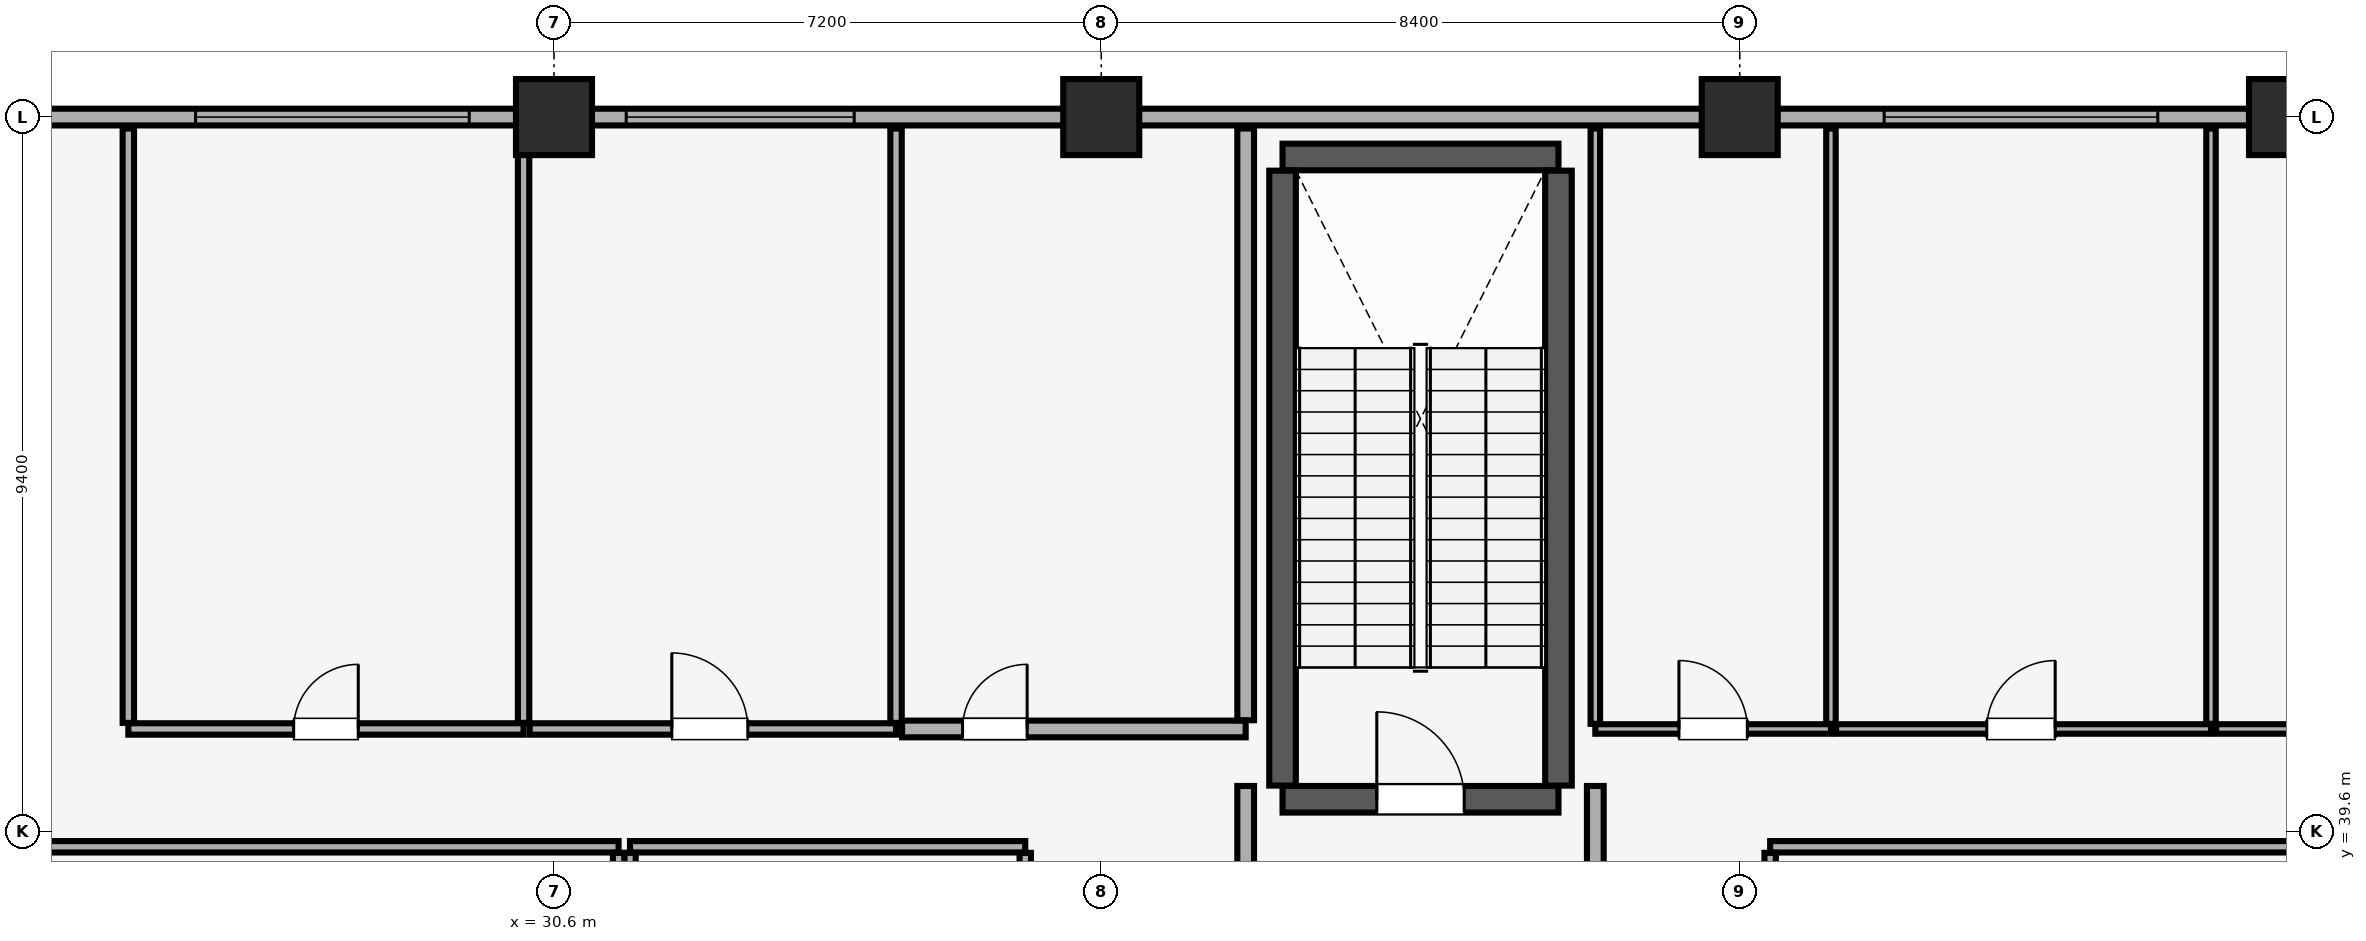
"""IFC4 building model, lengths in metres.
Left out: names, types, materials, properties, quantities, classifications, styles, units other than length and angle.
Written with IfcOpenShell. Run it as: python <this file> out.ifc"""

import sys

from ifc_helpers import new_model, si_unit, direction, frame, frame_2d, origin, origin_2d, place, context, subcontext, project, spatial, rectangle, extrude, element, fill, save


model = new_model("IFC4")
c1 = context("Model", 3, precision=1e-05, world=origin(), true_north=direction((0.0, 1.0)))
c2 = subcontext(c1, "Body", "Model", "MODEL_VIEW")
j1 = project(units=[si_unit("LENGTHUNIT", "METRE"), si_unit("PLANEANGLEUNIT", "RADIAN")], contexts=[c1])
p1 = place(None, origin())
s1 = spatial("IfcSite", under=j1, at=p1, CompositionType="ELEMENT")
p2 = place(p1, origin())
s2 = spatial("IfcBuilding", under=s1, at=p2, CompositionType="ELEMENT")
p3 = place(p2, frame((0.0, 0.0, 300.2)))
s3 = spatial("IfcBuildingStorey", under=s2, at=p3, CompositionType="ELEMENT", Elevation=300.2)
for number, where, z_axis, x_axis in (
    (1, (30.6, 49.0, 0.0), (0.0, 0.0, 1.0), (1.0, 0.0, 0.0)),
    (2, (37.8, 49.0, 0.0), (0.0, 0.0, 1.0), (1.0, 0.0, 0.0)),
    (3, (46.2, 49.0, 0.0), (0.0, 0.0, 1.0), (1.0, 0.0, 0.0)),
    (4, (53.4, 49.0, 0.0), (0.0, 0.0, 1.0), (1.0, 0.0, 0.0)),
):
    element("IfcColumn", number, at=place(p3, frame(where, z_axis=z_axis, x_axis=x_axis)), inside=s3, PredefinedType="COLUMN", context=c2, shape_type="SweptSolid", body=[
        extrude(rectangle(XDim=1.0, YDim=1.0, at=origin_2d()), origin(), (0.0, 0.0, 1.0), 5.12),
    ])
p4 = place(p3, frame((71.4, 49.0, 0.0), z_axis=(0.0, 0.0, 1.0), x_axis=(-1.0, 0.0, 0.0)))
e5 = element("IfcWall", 5, at=p4, inside=s3, PredefinedType="SOLIDWALL", context=c2, shape_type="SweptSolid", body=[
    extrude(rectangle(XDim=58.8, YDim=0.22, at=frame_2d((29.4, 0.0))), origin(), (0.0, 0.0, 1.0), 4.32),
])
p5 = place(p4, frame((56.365, 0.0, 0.85)))
e6 = element("IfcOpeningElement", 6, at=p5, cuts=e5, PredefinedType="OPENING", context=c2, shape_type="SweptSolid", body=[
    extrude(rectangle(XDim=1.5, YDim=1.4, at=frame_2d((0.75, 0.7))), frame((0.0, 0.12, 0.0), z_axis=(0.0, -1.0, 0.0), x_axis=(1.0, 0.0, 0.0)), (0.0, 0.0, 1.0), 0.24),
])
p6 = place(p4, frame((0.935, 0.0, 0.85)))
e7 = element("IfcOpeningElement", 7, at=p6, cuts=e5, PredefinedType="OPENING", context=c2, shape_type="SweptSolid", body=[
    extrude(rectangle(XDim=1.5, YDim=1.4, at=frame_2d((0.75, 0.7))), frame((0.0, 0.12, 0.0), z_axis=(0.0, -1.0, 0.0), x_axis=(1.0, 0.0, 0.0)), (0.0, 0.0, 1.0), 0.24),
])
p7 = place(p4, frame((41.915, 0.0, 0.9)))
e8 = element("IfcOpeningElement", 8, at=p7, cuts=e5, PredefinedType="OPENING", context=c2, shape_type="SweptSolid", body=[
    extrude(rectangle(XDim=3.6, YDim=1.5, at=frame_2d((1.8, 0.75))), frame((0.0, 0.12, 0.0), z_axis=(0.0, -1.0, 0.0), x_axis=(1.0, 0.0, 0.0)), (0.0, 0.0, 1.0), 0.24),
])
p8 = place(p4, frame((36.85, 0.0, 0.9)))
e9 = element("IfcOpeningElement", 9, at=p8, cuts=e5, PredefinedType="OPENING", context=c2, shape_type="SweptSolid", body=[
    extrude(rectangle(XDim=3.0, YDim=1.5, at=frame_2d((1.5, 0.75))), frame((0.0, 0.12, 0.0), z_axis=(0.0, -1.0, 0.0), x_axis=(1.0, 0.0, 0.0)), (0.0, 0.0, 1.0), 0.24),
])
p9 = place(p4, frame((19.7, 0.0, 0.9)))
e10 = element("IfcOpeningElement", 10, at=p9, cuts=e5, PredefinedType="OPENING", context=c2, shape_type="SweptSolid", body=[
    extrude(rectangle(XDim=3.6, YDim=1.5, at=frame_2d((1.8, 0.75))), frame((0.0, 0.12, 0.0), z_axis=(0.0, -1.0, 0.0), x_axis=(1.0, 0.0, 0.0)), (0.0, 0.0, 1.0), 0.24),
])
p10 = place(p4, frame((14.635, 0.0, 0.9)))
e11 = element("IfcOpeningElement", 11, at=p10, cuts=e5, PredefinedType="OPENING", context=c2, shape_type="SweptSolid", body=[
    extrude(rectangle(XDim=2.4, YDim=1.5, at=frame_2d((1.2, 0.75))), frame((0.0, 0.12, 0.0), z_axis=(0.0, -1.0, 0.0), x_axis=(1.0, 0.0, 0.0)), (0.0, 0.0, 1.0), 0.24),
])
p11 = place(p3, frame((40.185, 40.025, 0.0), z_axis=(0.0, 0.0, 1.0), x_axis=(1.0, 0.0, 0.0)))
e12 = element("IfcWall", 12, at=p11, inside=s3, PredefinedType="SHEAR", context=c2, shape_type="SweptSolid", body=[
    extrude(rectangle(XDim=3.63, YDim=0.35, at=frame_2d((1.815, 0.0))), origin(), (0.0, 0.0, 1.0), 5.12),
])
p12 = place(p11, frame((1.24, 0.0, 0.0)))
e13 = element("IfcOpeningElement", 13, at=p12, cuts=e12, PredefinedType="OPENING", context=c2, shape_type="SweptSolid", body=[
    extrude(rectangle(XDim=1.15, YDim=2.15, at=frame_2d((0.575, 1.075))), frame((0.0, 0.185, 0.0), z_axis=(0.0, -1.0, 0.0), x_axis=(1.0, 0.0, 0.0)), (0.0, 0.0, 1.0), 0.37),
])
p13 = place(p3, frame((40.185, 48.475, 0.0), z_axis=(0.0, 0.0, 1.0), x_axis=(1.0, 0.0, 0.0)))
e14 = element("IfcWall", 14, at=p13, inside=s3, PredefinedType="SHEAR", context=c2, shape_type="SweptSolid", body=[
    extrude(rectangle(XDim=3.63, YDim=0.35, at=frame_2d((1.815, 0.0))), origin(), (0.0, 0.0, 1.0), 5.12),
])
for number, where, z_axis, x_axis in (
    (15, (40.185, 40.205, 0.0), (0.0, 0.0, 1.0), (0.0, 1.0, 0.0)),
    (16, (43.815, 40.205, 0.0), (0.0, 0.0, 1.0), (0.0, 1.0, 0.0)),
):
    element("IfcWall", number, at=place(p3, frame(where, z_axis=z_axis, x_axis=x_axis)), inside=s3, PredefinedType="SHEAR", context=c2, shape_type="SweptSolid", body=[
        extrude(rectangle(XDim=8.09, YDim=0.35, at=frame_2d((4.045, 0.0))), origin(), (0.0, 0.0, 1.0), 5.12),
    ])
for number, where, z_axis, x_axis in (
    (17, (39.7, 34.415, 0.0), (0.0, 0.0, 1.0), (0.0, 1.0, 0.0)),
    (18, (44.3, 34.415, 0.0), (0.0, 0.0, 1.0), (0.0, 1.0, 0.0)),
):
    element("IfcWall", number, at=place(p3, frame(where, z_axis=z_axis, x_axis=x_axis)), inside=s3, PredefinedType="PARTITIONING", context=c2, shape_type="SweptSolid", body=[
        extrude(rectangle(XDim=5.785, YDim=0.22, at=frame_2d((2.893, 0.0))), origin(), (0.0, 0.0, 1.0), 5.12),
    ])
p14 = place(p3, frame((31.6, 39.4, 0.0), z_axis=(0.0, 0.0, 1.0), x_axis=(1.0, 0.0, 0.0)))
e19 = element("IfcWall", 19, at=p14, inside=s3, PredefinedType="PARTITIONING", context=c2, shape_type="SweptSolid", body=[
    extrude(rectangle(XDim=5.2, YDim=0.15, at=frame_2d((2.6, 0.0))), origin(), (0.0, 0.0, 1.0), 5.12),
])
for number, where, z_axis, x_axis in (
    (20, (31.6, 34.38, 0.0), (0.0, 0.0, 1.0), (0.0, 1.0, 0.0)),
    (21, (36.8, 34.38, 0.0), (0.0, 0.0, 1.0), (0.0, 1.0, 0.0)),
):
    element("IfcWall", number, at=place(p3, frame(where, z_axis=z_axis, x_axis=x_axis)), inside=s3, PredefinedType="PARTITIONING", context=c2, shape_type="SweptSolid", body=[
        extrude(rectangle(XDim=4.94, YDim=0.15, at=frame_2d((2.47, 0.0))), origin(), (0.0, 0.0, 1.0), 5.12),
    ])
p15 = place(p3, frame((23.8, 39.4, 0.0), z_axis=(0.0, 0.0, 1.0), x_axis=(1.0, 0.0, 0.0)))
e22 = element("IfcWall", 22, at=p15, inside=s3, PredefinedType="PARTITIONING", context=c2, shape_type="SweptSolid", body=[
    extrude(rectangle(XDim=7.65, YDim=0.15, at=frame_2d((3.825, 0.0))), origin(), (0.0, 0.0, 1.0), 5.12),
])
p16 = place(p3, frame((31.45, 34.38, 0.0), z_axis=(0.0, 0.0, 1.0), x_axis=(0.0, 1.0, 0.0)))
e23 = element("IfcWall", 23, at=p16, inside=s3, PredefinedType="PARTITIONING", context=c2, shape_type="SweptSolid", body=[
    extrude(rectangle(XDim=4.94, YDim=0.15, at=frame_2d((2.47, 0.0))), origin(), (0.0, 0.0, 1.0), 5.12),
])
p17 = place(p3, frame((46.6, 39.4, 0.0), z_axis=(0.0, 0.0, 1.0), x_axis=(1.0, 0.0, 0.0)))
e24 = element("IfcWall", 24, at=p17, inside=s3, PredefinedType="PARTITIONING", context=c2, shape_type="SweptSolid", body=[
    extrude(rectangle(XDim=7.95, YDim=0.15, at=frame_2d((3.975, 0.0))), origin(), (0.0, 0.0, 1.0), 5.12),
])
p18 = place(p3, frame((46.6, 34.38, 0.0), z_axis=(0.0, 0.0, 1.0), x_axis=(0.0, 1.0, 0.0)))
e25 = element("IfcWall", 25, at=p18, inside=s3, PredefinedType="PARTITIONING", context=c2, shape_type="SweptSolid", body=[
    extrude(rectangle(XDim=4.94, YDim=0.15, at=frame_2d((2.47, 0.0))), origin(), (0.0, 0.0, 1.0), 5.12),
])
p19 = place(p3, frame((25.0, 40.95, 0.0), z_axis=(0.0, 0.0, 1.0), x_axis=(1.0, 0.0, 0.0)))
e26 = element("IfcWall", 26, at=p19, inside=s3, PredefinedType="PARTITIONING", context=c2, shape_type="SweptSolid", body=[
    extrude(rectangle(XDim=5.2, YDim=0.15, at=frame_2d((2.6, 0.0))), origin(), (0.0, 0.0, 1.0), 5.12),
])
p20 = place(p19, frame((2.175, 0.0, 0.0)))
e27 = element("IfcOpeningElement", 27, at=p20, cuts=e26, PredefinedType="OPENING", context=c2, shape_type="SweptSolid", body=[
    extrude(rectangle(XDim=0.85, YDim=2.1, at=frame_2d((0.425, 1.05))), frame((0.0, 0.085, 0.0), z_axis=(0.0, -1.0, 0.0), x_axis=(1.0, 0.0, 0.0)), (0.0, 0.0, 1.0), 0.17),
])
for number, where, z_axis, x_axis in (
    (28, (25.0, 41.03, 0.0), (0.0, 0.0, 1.0), (0.0, 1.0, 0.0)),
    (29, (30.2, 41.03, 0.0), (0.0, 0.0, 1.0), (0.0, 1.0, 0.0)),
):
    element("IfcWall", number, at=place(p3, frame(where, z_axis=z_axis, x_axis=x_axis)), inside=s3, PredefinedType="PARTITIONING", context=c2, shape_type="SweptSolid", body=[
        extrude(rectangle(XDim=7.82, YDim=0.15, at=frame_2d((3.91, 0.0))), origin(), (0.0, 0.0, 1.0), 5.12),
    ])
p21 = place(p3, frame((30.28, 40.95, 0.0), z_axis=(0.0, 0.0, 1.0), x_axis=(1.0, 0.0, 0.0)))
e30 = element("IfcWall", 30, at=p21, inside=s3, PredefinedType="PARTITIONING", context=c2, shape_type="SweptSolid", body=[
    extrude(rectangle(XDim=4.82, YDim=0.15, at=frame_2d((2.41, 0.0))), origin(), (0.0, 0.0, 1.0), 5.12),
])
p22 = place(p21, frame((1.87, 0.0, 0.0)))
e31 = element("IfcOpeningElement", 31, at=p22, cuts=e30, PredefinedType="OPENING", context=c2, shape_type="SweptSolid", body=[
    extrude(rectangle(XDim=1.0, YDim=2.15, at=frame_2d((0.5, 1.075))), frame((0.0, 0.085, 0.0), z_axis=(0.0, -1.0, 0.0), x_axis=(1.0, 0.0, 0.0)), (0.0, 0.0, 1.0), 0.17),
])
p23 = place(p3, frame((35.1, 41.03, 0.0), z_axis=(0.0, 0.0, 1.0), x_axis=(0.0, 1.0, 0.0)))
e32 = element("IfcWall", 32, at=p23, inside=s3, PredefinedType="PARTITIONING", context=c2, shape_type="SweptSolid", body=[
    extrude(rectangle(XDim=7.82, YDim=0.15, at=frame_2d((3.91, 0.0))), origin(), (0.0, 0.0, 1.0), 5.12),
])
p24 = place(p3, frame((35.18, 40.95, 0.0), z_axis=(0.0, 0.0, 1.0), x_axis=(1.0, 0.0, 0.0)))
e33 = element("IfcWall", 33, at=p24, inside=s3, PredefinedType="PARTITIONING", context=c2, shape_type="SweptSolid", body=[
    extrude(rectangle(XDim=4.52, YDim=0.22, at=frame_2d((2.26, 0.0))), origin(), (0.0, 0.0, 1.0), 5.12),
])
p25 = place(p24, frame((0.795, 0.0, 0.0)))
e34 = element("IfcOpeningElement", 34, at=p25, cuts=e33, PredefinedType="OPENING", context=c2, shape_type="SweptSolid", body=[
    extrude(rectangle(XDim=0.85, YDim=2.1, at=frame_2d((0.425, 1.05))), frame((0.0, 0.12, 0.0), z_axis=(0.0, -1.0, 0.0), x_axis=(1.0, 0.0, 0.0)), (0.0, 0.0, 1.0), 0.24),
])
p26 = place(p3, frame((39.7, 41.065, 0.0), z_axis=(0.0, 0.0, 1.0), x_axis=(0.0, 1.0, 0.0)))
e35 = element("IfcWall", 35, at=p26, inside=s3, PredefinedType="PARTITIONING", context=c2, shape_type="SweptSolid", body=[
    extrude(rectangle(XDim=7.785, YDim=0.22, at=frame_2d((3.893, 0.0))), origin(), (0.0, 0.0, 1.0), 5.12),
])
p27 = place(p3, frame((44.3, 40.95, 0.0), z_axis=(0.0, 0.0, 1.0), x_axis=(1.0, 0.0, 0.0)))
e36 = element("IfcWall", 36, at=p27, inside=s3, PredefinedType="PARTITIONING", context=c2, shape_type="SweptSolid", body=[
    extrude(rectangle(XDim=3.1, YDim=0.125, at=frame_2d((1.55, 0.0))), origin(), (0.0, 0.0, 1.0), 5.12),
])
p28 = place(p27, frame((1.1, 0.0, 0.0)))
e37 = element("IfcOpeningElement", 37, at=p28, cuts=e36, PredefinedType="OPENING", context=c2, shape_type="SweptSolid", body=[
    extrude(rectangle(XDim=0.9, YDim=2.1, at=frame_2d((0.45, 1.05))), frame((0.0, 0.073, 0.0), z_axis=(0.0, -1.0, 0.0), x_axis=(1.0, 0.0, 0.0)), (0.0, 0.0, 1.0), 0.145),
])
for number, where, z_axis, x_axis in (
    (38, (44.3, 41.018, 0.0), (0.0, 0.0, 1.0), (0.0, 1.0, 0.0)),
    (39, (47.4, 41.018, 0.0), (0.0, 0.0, 1.0), (0.0, 1.0, 0.0)),
):
    element("IfcWall", number, at=place(p3, frame(where, z_axis=z_axis, x_axis=x_axis)), inside=s3, PredefinedType="PARTITIONING", context=c2, shape_type="SweptSolid", body=[
        extrude(rectangle(XDim=7.833, YDim=0.125, at=frame_2d((3.916, 0.0))), origin(), (0.0, 0.0, 1.0), 5.12),
    ])
p29 = place(p3, frame((47.468, 40.95, 0.0), z_axis=(0.0, 0.0, 1.0), x_axis=(1.0, 0.0, 0.0)))
e40 = element("IfcWall", 40, at=p29, inside=s3, PredefinedType="PARTITIONING", context=c2, shape_type="SweptSolid", body=[
    extrude(rectangle(XDim=4.932, YDim=0.125, at=frame_2d((2.466, 0.0))), origin(), (0.0, 0.0, 1.0), 5.12),
])
p30 = place(p29, frame((1.982, 0.0, 0.0)))
e41 = element("IfcOpeningElement", 41, at=p30, cuts=e40, PredefinedType="OPENING", context=c2, shape_type="SweptSolid", body=[
    extrude(rectangle(XDim=0.9, YDim=2.1, at=frame_2d((0.45, 1.05))), frame((0.0, 0.073, 0.0), z_axis=(0.0, -1.0, 0.0), x_axis=(1.0, 0.0, 0.0)), (0.0, 0.0, 1.0), 0.145),
])
p31 = place(p3, frame((52.4, 41.018, 0.0), z_axis=(0.0, 0.0, 1.0), x_axis=(0.0, 1.0, 0.0)))
e42 = element("IfcWall", 42, at=p31, inside=s3, PredefinedType="PARTITIONING", context=c2, shape_type="SweptSolid", body=[
    extrude(rectangle(XDim=7.833, YDim=0.125, at=frame_2d((3.916, 0.0))), origin(), (0.0, 0.0, 1.0), 5.12),
])
p32 = place(p3, frame((52.468, 40.95, 0.0), z_axis=(0.0, 0.0, 1.0), x_axis=(1.0, 0.0, 0.0)))
e43 = element("IfcWall", 43, at=p32, inside=s3, PredefinedType="PARTITIONING", context=c2, shape_type="SweptSolid", body=[
    extrude(rectangle(XDim=5.032, YDim=0.125, at=frame_2d((2.516, 0.0))), origin(), (0.0, 0.0, 1.0), 5.12),
])
p33 = place(p32, frame((2.032, 0.0, 0.0)))
e44 = element("IfcOpeningElement", 44, at=p33, cuts=e43, PredefinedType="OPENING", context=c2, shape_type="SweptSolid", body=[
    extrude(rectangle(XDim=0.9, YDim=2.1, at=frame_2d((0.45, 1.05))), frame((0.0, 0.073, 0.0), z_axis=(0.0, -1.0, 0.0), x_axis=(1.0, 0.0, 0.0)), (0.0, 0.0, 1.0), 0.145),
])
p34 = place(p7, origin())
e45 = element("IfcWindow", 45, at=p34, inside=s3, PartitioningType="SINGLE_PANEL", PredefinedType="WINDOW", context=c2, shape_type="SweptSolid", body=[
    extrude(rectangle(XDim=3.6, YDim=1.5, at=frame_2d((1.8, 0.75))), frame((0.0, 0.03, 0.0), z_axis=(0.0, -1.0, 0.0), x_axis=(1.0, 0.0, 0.0)), (0.0, 0.0, 1.0), 0.06),
])
fill(e8, e45)
p35 = place(p8, origin())
e46 = element("IfcWindow", 46, at=p35, inside=s3, PartitioningType="SINGLE_PANEL", PredefinedType="WINDOW", context=c2, shape_type="SweptSolid", body=[
    extrude(rectangle(XDim=3.0, YDim=1.5, at=frame_2d((1.5, 0.75))), frame((0.0, 0.03, 0.0), z_axis=(0.0, -1.0, 0.0), x_axis=(1.0, 0.0, 0.0)), (0.0, 0.0, 1.0), 0.06),
])
fill(e9, e46)
p36 = place(p9, origin())
e47 = element("IfcWindow", 47, at=p36, inside=s3, PartitioningType="SINGLE_PANEL", PredefinedType="WINDOW", context=c2, shape_type="SweptSolid", body=[
    extrude(rectangle(XDim=3.6, YDim=1.5, at=frame_2d((1.8, 0.75))), frame((0.0, 0.03, 0.0), z_axis=(0.0, -1.0, 0.0), x_axis=(1.0, 0.0, 0.0)), (0.0, 0.0, 1.0), 0.06),
])
fill(e10, e47)
p37 = place(p12, origin())
e48 = element("IfcDoor", 48, at=p37, inside=s3, OperationType="SINGLE_SWING_LEFT", PredefinedType="DOOR", context=c2, shape_type="SweptSolid", body=[
    extrude(rectangle(XDim=1.15, YDim=2.15, at=frame_2d((0.575, 1.075))), frame((0.0, 0.025, 0.0), z_axis=(0.0, -1.0, 0.0), x_axis=(1.0, 0.0, 0.0)), (0.0, 0.0, 1.0), 0.05),
])
fill(e13, e48)
p38 = place(p20, origin())
e49 = element("IfcDoor", 49, at=p38, inside=s3, OperationType="SINGLE_SWING_RIGHT", PredefinedType="DOOR", context=c2, shape_type="SweptSolid", body=[
    extrude(rectangle(XDim=0.85, YDim=2.1, at=frame_2d((0.425, 1.05))), frame((0.0, 0.025, 0.0), z_axis=(0.0, -1.0, 0.0), x_axis=(1.0, 0.0, 0.0)), (0.0, 0.0, 1.0), 0.05),
])
fill(e27, e49)
p39 = place(p22, origin())
e50 = element("IfcDoor", 50, at=p39, inside=s3, OperationType="SINGLE_SWING_LEFT", PredefinedType="DOOR", context=c2, shape_type="SweptSolid", body=[
    extrude(rectangle(XDim=1.0, YDim=2.15, at=frame_2d((0.5, 1.075))), frame((0.0, 0.025, 0.0), z_axis=(0.0, -1.0, 0.0), x_axis=(1.0, 0.0, 0.0)), (0.0, 0.0, 1.0), 0.05),
])
fill(e31, e50)
p40 = place(p25, origin())
e51 = element("IfcDoor", 51, at=p40, inside=s3, OperationType="SINGLE_SWING_RIGHT", PredefinedType="DOOR", context=c2, shape_type="SweptSolid", body=[
    extrude(rectangle(XDim=0.85, YDim=2.1, at=frame_2d((0.425, 1.05))), frame((0.0, 0.025, 0.0), z_axis=(0.0, -1.0, 0.0), x_axis=(1.0, 0.0, 0.0)), (0.0, 0.0, 1.0), 0.05),
])
fill(e34, e51)
p41 = place(p28, origin())
e52 = element("IfcDoor", 52, at=p41, inside=s3, OperationType="SINGLE_SWING_LEFT", PredefinedType="DOOR", context=c2, shape_type="SweptSolid", body=[
    extrude(rectangle(XDim=0.9, YDim=2.1, at=frame_2d((0.45, 1.05))), frame((0.0, 0.025, 0.0), z_axis=(0.0, -1.0, 0.0), x_axis=(1.0, 0.0, 0.0)), (0.0, 0.0, 1.0), 0.05),
])
fill(e37, e52)
p42 = place(p30, origin())
e53 = element("IfcDoor", 53, at=p42, inside=s3, OperationType="SINGLE_SWING_RIGHT", PredefinedType="DOOR", context=c2, shape_type="SweptSolid", body=[
    extrude(rectangle(XDim=0.9, YDim=2.1, at=frame_2d((0.45, 1.05))), frame((0.0, 0.025, 0.0), z_axis=(0.0, -1.0, 0.0), x_axis=(1.0, 0.0, 0.0)), (0.0, 0.0, 1.0), 0.05),
])
fill(e41, e53)
save(model, sys.argv[1])
